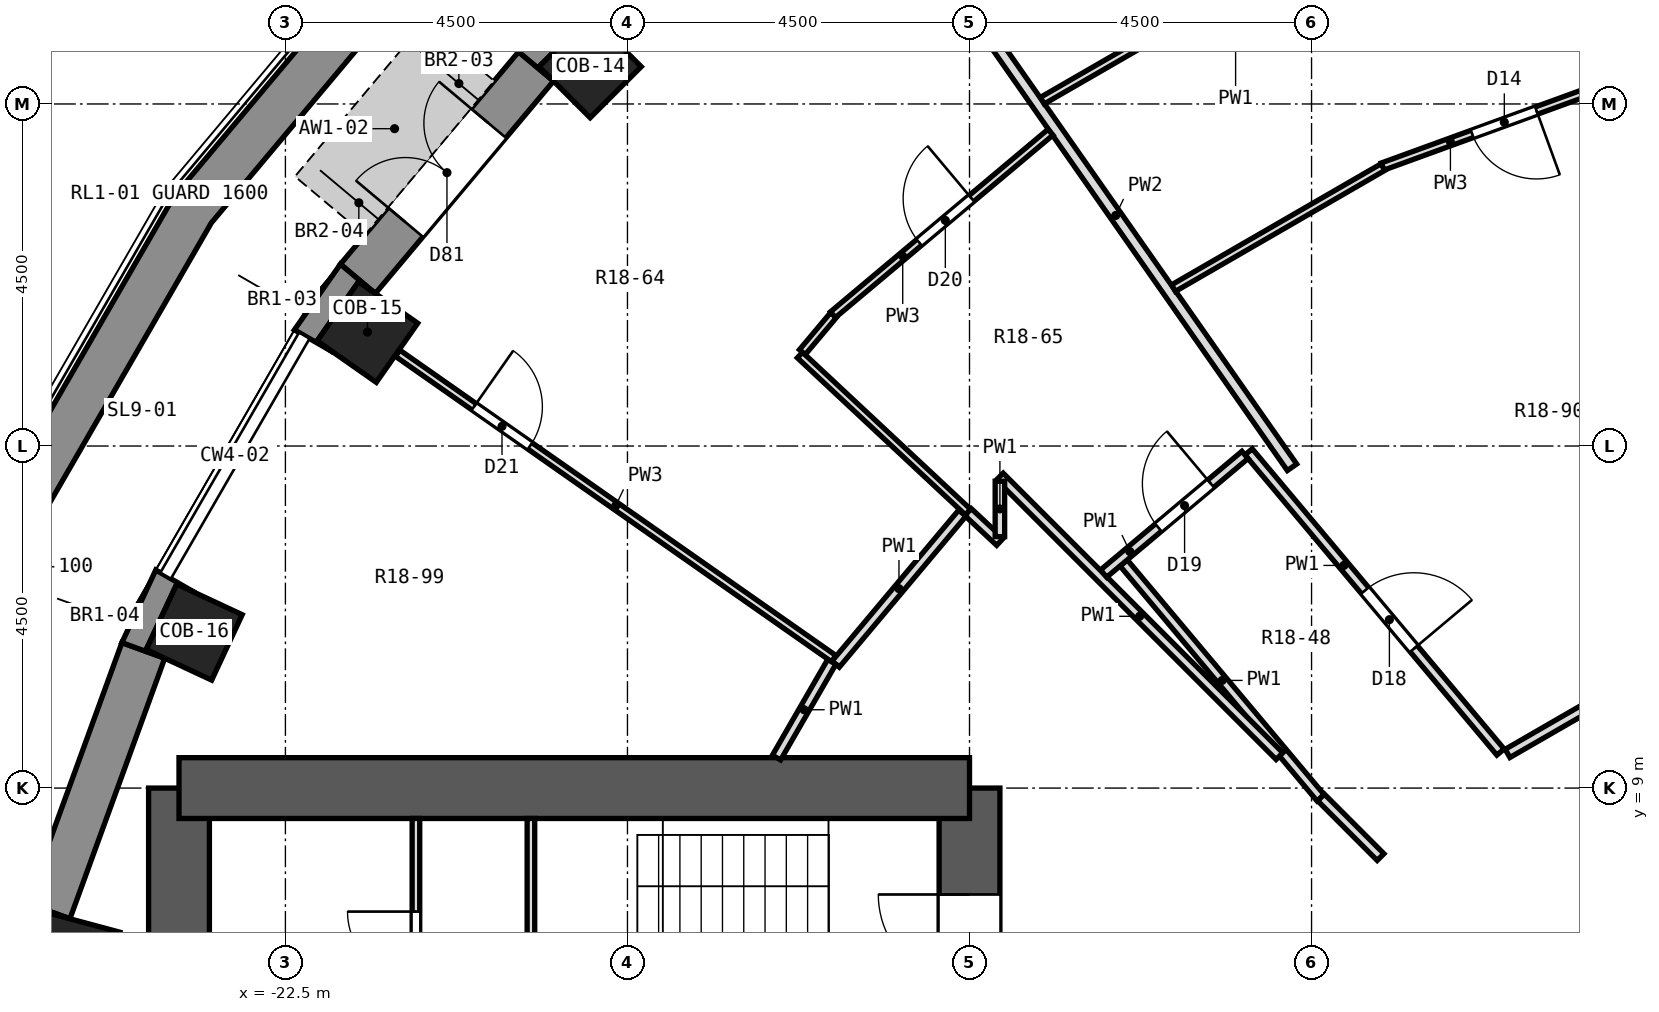
"""IFC4 building model, lengths in metres.
Left out: names, types, materials, properties, quantities, classifications, styles, units other than length and angle.
Written with IfcOpenShell. Run it as: python <this file> out.ifc"""

import sys

from ifc_helpers import new_model, si_unit, direction, frame, frame_2d, origin, origin_2d, place, context, subcontext, project, spatial, polyline, rectangle, outline, extrude, element, fill, save


model = new_model("IFC4")
c1 = context("Model", 3, precision=1e-05, world=origin(), true_north=direction((0.0, 1.0)))
c2 = subcontext(c1, "Body", "Model", "MODEL_VIEW")
j1 = project(units=[si_unit("LENGTHUNIT", "METRE"), si_unit("PLANEANGLEUNIT", "RADIAN")], contexts=[c1])
p1 = place(None, origin())
s1 = spatial("IfcSite", under=j1, at=p1, CompositionType="ELEMENT")
p2 = place(p1, origin())
s2 = spatial("IfcBuilding", under=s1, at=p2, CompositionType="ELEMENT")
p3 = place(p2, frame((0.0, 0.0, 101.8)))
s3 = spatial("IfcBuildingStorey", under=s2, at=p3, CompositionType="ELEMENT", Elevation=101.8)
for number, where, z_axis, x_axis in (
    (1, (-18.491, 18.491, 0.0), (0.0, 0.0, 1.0), (-0.707, 0.707, 0.0)),
    (2, (-21.421, 14.999, 0.0), (0.0, 0.0, 1.0), (-0.819, 0.574, 0.0)),
    (3, (-23.7, 11.052, 0.0), (0.0, 0.0, 1.0), (-0.906, 0.423, 0.0)),
    (4, (-25.259, 6.768, 0.0), (0.0, 0.0, 1.0), (-0.966, 0.259, 0.0)),
):
    element("IfcColumn", number, at=place(p3, frame(where, z_axis=z_axis, x_axis=x_axis)), inside=s3, PredefinedType="COLUMN", context=c2, shape_type="SweptSolid", body=[
        extrude(rectangle(XDim=0.95, YDim=0.95, at=origin_2d()), origin(), (0.0, 0.0, 1.0), 3.3),
    ])
p4 = place(p3, frame((-13.5, -9.0, 0.0), z_axis=(0.0, 0.0, 1.0), x_axis=(0.0, 1.0, 0.0)))
e5 = element("IfcWall", 5, at=p4, inside=s3, PredefinedType="SHEAR", context=c2, shape_type="SweptSolid", body=[
    extrude(rectangle(XDim=18.0, YDim=0.8, at=frame_2d((9.0, 0.0))), origin(), (0.0, 0.0, 1.0), 3.3),
])
p5 = place(p4, frame((15.4, 0.0, 0.0)))
e6 = element("IfcOpeningElement", 6, at=p5, cuts=e5, PredefinedType="OPENING", context=c2, shape_type="SweptSolid", body=[
    extrude(rectangle(XDim=1.2, YDim=2.1, at=frame_2d((0.6, 1.05))), frame((0.0, 0.412, 0.0), z_axis=(0.0, -1.0, 0.0), x_axis=(1.0, 0.0, 0.0)), (0.0, 0.0, 1.0), 0.824),
])
p6 = place(p4, frame((1.4, 0.0, 0.0)))
e7 = element("IfcOpeningElement", 7, at=p6, cuts=e5, PredefinedType="OPENING", context=c2, shape_type="SweptSolid", body=[
    extrude(rectangle(XDim=1.2, YDim=2.1, at=frame_2d((0.6, 1.05))), frame((0.0, 0.412, 0.0), z_axis=(0.0, -1.0, 0.0), x_axis=(1.0, 0.0, 0.0)), (0.0, 0.0, 1.0), 0.824),
])
p7 = place(p4, frame((7.5, 0.0, 0.0)))
e8 = element("IfcOpeningElement", 8, at=p7, cuts=e5, PredefinedType="OPENING", context=c2, shape_type="SweptSolid", body=[
    extrude(rectangle(XDim=3.0, YDim=2.4, at=frame_2d((1.5, 1.2))), frame((0.0, 0.412, 0.0), z_axis=(0.0, -1.0, 0.0), x_axis=(1.0, 0.0, 0.0)), (0.0, 0.0, 1.0), 0.824),
])
p8 = place(p3, frame((-23.9, -9.0, 0.0), z_axis=(0.0, 0.0, 1.0), x_axis=(0.0, 1.0, 0.0)))
e9 = element("IfcWall", 9, at=p8, inside=s3, PredefinedType="SHEAR", context=c2, shape_type="SweptSolid", body=[
    extrude(rectangle(XDim=18.0, YDim=0.8, at=frame_2d((9.0, 0.0))), origin(), (0.0, 0.0, 1.0), 3.3),
])
p9 = place(p3, frame((-13.5, 9.0, 0.0), z_axis=(0.0, 0.0, 1.0), x_axis=(-1.0, 0.0, 0.0)))
e10 = element("IfcWall", 10, at=p9, inside=s3, PredefinedType="SHEAR", context=c2, shape_type="SweptSolid", body=[
    extrude(rectangle(XDim=10.4, YDim=0.8, at=frame_2d((5.2, 0.0))), origin(), (0.0, 0.0, 1.0), 3.3),
])
p10 = place(p3, frame((-19.202, 18.494, 0.0), z_axis=(0.0, 0.0, 1.0), x_axis=(-0.642774476932, -0.766055462616, 0.0)))
e11 = element("IfcWall", 11, at=p10, inside=s3, PredefinedType="SOLIDWALL", context=c2, shape_type="SweptSolid", body=[
    extrude(rectangle(XDim=3.648, YDim=0.6, at=frame_2d((1.824, 0.0))), origin(), (0.0, 0.0, 1.0), 2.8),
])
p11 = place(p10, frame((0.974, 0.0, 0.0)))
e12 = element("IfcOpeningElement", 12, at=p11, cuts=e11, PredefinedType="OPENING", context=c2, shape_type="SweptSolid", body=[
    extrude(rectangle(XDim=1.7, YDim=2.4, at=frame_2d((0.85, 1.2))), frame((0.0, 0.312, 0.0), z_axis=(0.0, -1.0, 0.0), x_axis=(1.0, 0.0, 0.0)), (0.0, 0.0, 1.0), 0.624),
])
p12 = place(p3, frame((-24.369, 10.811, 0.0), z_axis=(0.0, 0.0, 1.0), x_axis=(-0.341990236633, -0.939703505393, 0.0)))
e13 = element("IfcWall", 13, at=p12, inside=s3, PredefinedType="SOLIDWALL", context=c2, shape_type="SweptSolid", body=[
    extrude(rectangle(XDim=3.648, YDim=0.6, at=frame_2d((1.824, 0.0))), origin(), (0.0, 0.0, 1.0), 2.8),
])
p13 = place(p3, origin())
e14 = element("IfcWall", 14, at=p13, inside=s3, PredefinedType="SOLIDWALL", context=c2, shape_type="SweptSolid", body=[
    extrude(outline(polyline([(-18.686, 19.432), (-19.432, 18.686), (-18.972, 18.301), (-19.163, 18.491), (-18.491, 19.163), (-18.301, 18.972), (-18.686, 19.432)])), origin(), (0.0, 0.0, 1.0), 2.8),
])
p14 = place(p3, origin())
e15 = element("IfcWall", 15, at=p14, inside=s3, PredefinedType="SOLIDWALL", context=c2, shape_type="SweptSolid", body=[
    extrude(outline(polyline([(-22.382, 15.028), (-21.862, 14.728), (-22.083, 14.882), (-21.538, 15.661), (-21.317, 15.506), (-21.777, 15.892), (-22.382, 15.028)])), origin(), (0.0, 0.0, 1.0), 2.8),
])
p15 = place(p3, origin())
e16 = element("IfcWall", 16, at=p15, inside=s3, PredefinedType="SOLIDWALL", context=c2, shape_type="SweptSolid", body=[
    extrude(outline(polyline([(-24.651, 10.913), (-24.087, 10.708), (-24.331, 10.822), (-23.93, 11.683), (-23.686, 11.569), (-24.206, 11.869), (-24.651, 10.913)])), origin(), (0.0, 0.0, 1.0), 2.8),
])
p16 = place(p3, origin())
e17 = element("IfcWall", 17, at=p16, inside=s3, PredefinedType="SOLIDWALL", context=c2, shape_type="SweptSolid", body=[
    extrude(outline(polyline([(-25.899, 7.486), (-26.172, 6.467), (-25.581, 6.363), (-25.841, 6.432), (-25.595, 7.35), (-25.335, 7.28), (-25.899, 7.486)])), origin(), (0.0, 0.0, 1.0), 2.8),
])
p17 = place(p3, frame((-2.527, 8.125, 0.0), z_axis=(0.0, 0.0, 1.0), x_axis=(-0.86604563398, -0.499964958637, 0.0)))
e18 = element("IfcWall", 18, at=p17, inside=s3, PredefinedType="SOLIDWALL", context=c2, shape_type="SweptSolid", body=[
    extrude(rectangle(XDim=3.747, YDim=0.6, at=frame_2d((1.874, 0.0))), origin(), (0.0, 0.0, 1.0), 2.8),
])
p18 = place(p17, frame((0.674, 0.0, 0.9)))
e19 = element("IfcOpeningElement", 19, at=p18, cuts=e18, PredefinedType="OPENING", context=c2, shape_type="SweptSolid", body=[
    extrude(rectangle(XDim=2.4, YDim=1.8, at=frame_2d((1.2, 0.9))), frame((0.0, 0.312, 0.0), z_axis=(0.0, -1.0, 0.0), x_axis=(1.0, 0.0, 0.0)), (0.0, 0.0, 1.0), 0.624),
])
p19 = place(p3, origin())
e20 = element("IfcWall", 20, at=p19, inside=s3, PredefinedType="PARAPET", context=c2, shape_type="SweptSolid", body=[
    extrude(outline(polyline([(-20.689, 20.689), (-23.967, 16.782), (-26.517, 12.365), (-25.971, 12.111), (-23.474, 16.437), (-20.263, 20.263), (-20.689, 20.689)])), origin(), (0.0, 0.0, 1.0), 0.5),
])
p20 = place(p3, frame((-13.896, 19.846, 0.0), z_axis=(0.0, 0.0, 1.0), x_axis=(0.573571733859, -0.819155336989, 0.0)))
e21 = element("IfcWall", 21, at=p20, inside=s3, PredefinedType="PARTITIONING", context=c2, shape_type="SweptSolid", body=[
    extrude(rectangle(XDim=8.088, YDim=0.15, at=frame_2d((4.044, 0.0))), origin(), (0.0, 0.0, 1.0), 2.8),
])
p21 = place(p3, frame((-11.472, 11.962, 0.0), z_axis=(0.0, 0.0, 1.0), x_axis=(0.642533165624, -0.766257875048, 0.0)))
e22 = element("IfcWall", 22, at=p21, inside=s3, PredefinedType="PARTITIONING", context=c2, shape_type="SweptSolid", body=[
    extrude(rectangle(XDim=4.033, YDim=0.125, at=frame_2d((2.017, 0.0))), origin(), (0.0, 0.0, 1.0), 2.8),
])
p22 = place(p3, frame((-9.828, 13.423, 0.0), z_axis=(0.0, 0.0, 1.0), x_axis=(0.642779949684, -0.766050870559, 0.0)))
e23 = element("IfcWall", 23, at=p22, inside=s3, PredefinedType="PARTITIONING", context=c2, shape_type="SweptSolid", body=[
    extrude(rectangle(XDim=5.155, YDim=0.125, at=frame_2d((2.578, 0.0))), origin(), (0.0, 0.0, 1.0), 2.8),
])
p23 = place(p22, frame((2.381, 0.0, 0.0)))
e24 = element("IfcOpeningElement", 24, at=p23, cuts=e23, PredefinedType="OPENING", context=c2, shape_type="SweptSolid", body=[
    extrude(rectangle(XDim=1.0, YDim=2.1, at=frame_2d((0.5, 1.05))), frame((0.0, 0.074, 0.0), z_axis=(0.0, -1.0, 0.0), x_axis=(1.0, 0.0, 0.0)), (0.0, 0.0, 1.0), 0.149),
])
p24 = place(p3, frame((-8.875, 8.876, 0.0), z_axis=(0.0, 0.0, 1.0), x_axis=(0.706666079052, -0.707547208826, 0.0)))
e25 = element("IfcWall", 25, at=p24, inside=s3, PredefinedType="PARTITIONING", context=c2, shape_type="SweptSolid", body=[
    extrude(rectangle(XDim=1.108, YDim=0.125, at=frame_2d((0.554, 0.0))), origin(), (0.0, 0.0, 1.0), 2.8),
])
p25 = place(p3, frame((-13.101, 13.099, 0.0), z_axis=(0.0, 0.0, 1.0), x_axis=(0.707106781187, -0.707106781187, 0.0)))
e26 = element("IfcWall", 26, at=p25, inside=s3, PredefinedType="PARTITIONING", context=c2, shape_type="SweptSolid", body=[
    extrude(rectangle(XDim=5.203, YDim=0.125, at=frame_2d((2.602, 0.0))), origin(), (0.0, 0.0, 1.0), 2.8),
])
p26 = place(p3, frame((-15.731, 14.697, 0.0), z_axis=(0.0, 0.0, 1.0), x_axis=(0.730698385908, -0.682700423928, 0.0)))
e27 = element("IfcWall", 27, at=p26, inside=s3, PredefinedType="PARTITIONING", context=c2, shape_type="SweptSolid", body=[
    extrude(rectangle(XDim=3.026, YDim=0.1, at=frame_2d((1.513, 0.0))), origin(), (0.0, 0.0, 1.0), 2.8),
])
p27 = place(p3, frame((-13.52, 12.631, 0.0), z_axis=(0.0, 0.0, 1.0), x_axis=(0.730729867614, -0.682666727311, 0.0)))
e28 = element("IfcWall", 28, at=p27, inside=s3, PredefinedType="PARTITIONING", context=c2, shape_type="SweptSolid", body=[
    extrude(rectangle(XDim=0.574, YDim=0.125, at=frame_2d((0.287, 0.0))), origin(), (0.0, 0.0, 1.0), 2.8),
])
p28 = place(p3, frame((-21.024, 14.721, 0.0), z_axis=(0.0, 0.0, 1.0), x_axis=(0.81911727686, -0.573626086183, 0.0)))
e29 = element("IfcWall", 29, at=p28, inside=s3, PredefinedType="PARTITIONING", context=c2, shape_type="SweptSolid", body=[
    extrude(rectangle(XDim=7.004, YDim=0.1, at=frame_2d((3.502, 0.0))), origin(), (0.0, 0.0, 1.0), 2.8),
])
p29 = place(p28, frame((1.226, 0.0, 0.0)))
e30 = element("IfcOpeningElement", 30, at=p29, cuts=e29, PredefinedType="OPENING", context=c2, shape_type="SweptSolid", body=[
    extrude(rectangle(XDim=0.9, YDim=2.1, at=frame_2d((0.45, 1.05))), frame((0.0, 0.062, 0.0), z_axis=(0.0, -1.0, 0.0), x_axis=(1.0, 0.0, 0.0)), (0.0, 0.0, 1.0), 0.124),
])
p30 = place(p3, frame((-8.066, 17.177, 0.0), z_axis=(0.0, 0.0, 1.0), x_axis=(0.939726606236, 0.341926754629, 0.0)))
e31 = element("IfcWall", 31, at=p30, inside=s3, PredefinedType="PARTITIONING", context=c2, shape_type="SweptSolid", body=[
    extrude(rectangle(XDim=3.308, YDim=0.1, at=frame_2d((1.654, 0.0))), origin(), (0.0, 0.0, 1.0), 2.8),
])
p31 = place(p30, frame((1.254, 0.0, 0.0)))
e32 = element("IfcOpeningElement", 32, at=p31, cuts=e31, PredefinedType="OPENING", context=c2, shape_type="SweptSolid", body=[
    extrude(rectangle(XDim=0.9, YDim=2.1, at=frame_2d((0.45, 1.05))), frame((0.0, 0.062, 0.0), z_axis=(0.0, -1.0, 0.0), x_axis=(1.0, 0.0, 0.0)), (0.0, 0.0, 1.0), 0.124),
])
p32 = place(p3, frame((-6.421, 9.456, 0.0), z_axis=(0.0, 0.0, 1.0), x_axis=(0.866153397047, 0.499778243608, 0.0)))
e33 = element("IfcWall", 33, at=p32, inside=s3, PredefinedType="PARTITIONING", context=c2, shape_type="SweptSolid", body=[
    extrude(rectangle(XDim=1.768, YDim=0.125, at=frame_2d((0.884, 0.0))), origin(), (0.0, 0.0, 1.0), 2.8),
])
p33 = place(p3, frame((-10.816, 15.578, 0.0), z_axis=(0.0, 0.0, 1.0), x_axis=(0.865900530636, 0.500216224292, 0.0)))
e34 = element("IfcWall", 34, at=p33, inside=s3, PredefinedType="PARTITIONING", context=c2, shape_type="SweptSolid", body=[
    extrude(rectangle(XDim=3.181, YDim=0.1, at=frame_2d((1.591, 0.0))), origin(), (0.0, 0.0, 1.0), 2.8),
])
p34 = place(p3, frame((-12.542, 18.044, 0.0), z_axis=(0.0, 0.0, 1.0), x_axis=(0.866154304779, 0.499776670437, 0.0)))
e35 = element("IfcWall", 35, at=p34, inside=s3, PredefinedType="PARTITIONING", context=c2, shape_type="SweptSolid", body=[
    extrude(rectangle(XDim=2.079, YDim=0.1, at=frame_2d((1.04, 0.0))), origin(), (0.0, 0.0, 1.0), 2.8),
])
p35 = place(p3, frame((-11.736, 11.822, 0.0), z_axis=(0.0, 0.0, 1.0), x_axis=(0.765966295507, 0.642880730888, 0.0)))
e36 = element("IfcWall", 36, at=p35, inside=s3, PredefinedType="PARTITIONING", context=c2, shape_type="SweptSolid", body=[
    extrude(rectangle(XDim=2.428, YDim=0.125, at=frame_2d((1.214, 0.0))), origin(), (0.0, 0.0, 1.0), 2.8),
])
p36 = place(p35, frame((0.941, 0.0, 0.0)))
e37 = element("IfcOpeningElement", 37, at=p36, cuts=e36, PredefinedType="OPENING", context=c2, shape_type="SweptSolid", body=[
    extrude(rectangle(XDim=0.9, YDim=2.1, at=frame_2d((0.45, 1.05))), frame((0.0, 0.074, 0.0), z_axis=(0.0, -1.0, 0.0), x_axis=(1.0, 0.0, 0.0)), (0.0, 0.0, 1.0), 0.149),
])
p37 = place(p3, frame((-15.298, 15.226, 0.0), z_axis=(0.0, 0.0, 1.0), x_axis=(0.766080513043, 0.642744620775, 0.0)))
e38 = element("IfcWall", 38, at=p37, inside=s3, PredefinedType="PARTITIONING", context=c2, shape_type="SweptSolid", body=[
    extrude(rectangle(XDim=3.737, YDim=0.1, at=frame_2d((1.869, 0.0))), origin(), (0.0, 0.0, 1.0), 2.8),
])
p38 = place(p37, frame((1.482, 0.0, 0.0)))
e39 = element("IfcOpeningElement", 39, at=p38, cuts=e38, PredefinedType="OPENING", context=c2, shape_type="SweptSolid", body=[
    extrude(rectangle(XDim=0.9, YDim=2.1, at=frame_2d((0.45, 1.05))), frame((0.0, 0.062, 0.0), z_axis=(0.0, -1.0, 0.0), x_axis=(1.0, 0.0, 0.0)), (0.0, 0.0, 1.0), 0.124),
])
p39 = place(p3, frame((-15.261, 10.63, 0.0), z_axis=(0.0, 0.0, 1.0), x_axis=(0.642663987788, 0.766148157213, 0.0)))
e40 = element("IfcWall", 40, at=p39, inside=s3, PredefinedType="PARTITIONING", context=c2, shape_type="SweptSolid", body=[
    extrude(rectangle(XDim=2.592, YDim=0.125, at=frame_2d((1.296, 0.0))), origin(), (0.0, 0.0, 1.0), 2.8),
])
p40 = place(p3, frame((-15.699, 14.735, 0.0), z_axis=(0.0, 0.0, 1.0), x_axis=(0.642984258382, 0.765879392249, 0.0)))
e41 = element("IfcWall", 41, at=p40, inside=s3, PredefinedType="PARTITIONING", context=c2, shape_type="SweptSolid", body=[
    extrude(rectangle(XDim=0.634, YDim=0.1, at=frame_2d((0.317, 0.0))), origin(), (0.0, 0.0, 1.0), 2.8),
])
p41 = place(p3, frame((-16.039, 9.401, 0.0), z_axis=(0.0, 0.0, 1.0), x_axis=(0.499950205064, 0.866054150996, 0.0)))
e42 = element("IfcWall", 42, at=p41, inside=s3, PredefinedType="PARTITIONING", context=c2, shape_type="SweptSolid", body=[
    extrude(rectangle(XDim=1.454, YDim=0.125, at=frame_2d((0.727, 0.0))), origin(), (0.0, 0.0, 1.0), 2.8),
])
p42 = place(p3, frame((-13.1, 12.309, 0.0), z_axis=(0.0, 0.0, 1.0), x_axis=(0.0, 1.0, 0.0)))
e43 = element("IfcWall", 43, at=p42, inside=s3, PredefinedType="PARTITIONING", context=c2, shape_type="SweptSolid", body=[
    extrude(rectangle(XDim=0.728, YDim=0.125, at=frame_2d((0.364, 0.0))), origin(), (0.0, 0.0, 1.0), 2.8),
])
p43 = place(p3, frame((-19.27, 5.25, 0.0), z_axis=(0.0, 0.0, 1.0), x_axis=(0.0, 1.0, 0.0)))
e44 = element("IfcWall", 44, at=p43, inside=s3, PredefinedType="PARTITIONING", context=c2, shape_type="SweptSolid", body=[
    extrude(rectangle(XDim=3.35, YDim=0.1, at=frame_2d((1.675, 0.0))), origin(), (0.0, 0.0, 1.0), 2.8),
])
p44 = place(p3, frame((-20.783, 5.25, 0.0), z_axis=(0.0, 0.0, 1.0), x_axis=(0.0, 1.0, 0.0)))
e45 = element("IfcWall", 45, at=p44, inside=s3, PredefinedType="PARTITIONING", context=c2, shape_type="SweptSolid", body=[
    extrude(rectangle(XDim=3.35, YDim=0.1, at=frame_2d((1.675, 0.0))), origin(), (0.0, 0.0, 1.0), 2.8),
])
p45 = place(p44, frame((1.225, 0.0, 0.0)))
e46 = element("IfcOpeningElement", 46, at=p45, cuts=e45, PredefinedType="OPENING", context=c2, shape_type="SweptSolid", body=[
    extrude(rectangle(XDim=0.9, YDim=2.1, at=frame_2d((0.45, 1.05))), frame((0.0, 0.062, 0.0), z_axis=(0.0, -1.0, 0.0), x_axis=(1.0, 0.0, 0.0)), (0.0, 0.0, 1.0), 0.124),
])
p46 = place(p11, frame((1.7, 0.0, 0.0), z_axis=(0.0, 0.0, 1.0), x_axis=(-1.0, 0.0, 0.0)))
e47 = element("IfcDoor", 47, at=p46, inside=s3, OperationType="DOUBLE_DOOR_SINGLE_SWING", PredefinedType="DOOR", context=c2, shape_type="SweptSolid", body=[
    extrude(rectangle(XDim=1.7, YDim=2.4, at=frame_2d((0.85, 1.2))), frame((0.0, -0.075, 0.0), z_axis=(0.0, -1.0, 0.0), x_axis=(1.0, 0.0, 0.0)), (0.0, 0.0, 1.0), 0.05),
])
fill(e12, e47)
p47 = place(p31, frame((0.9, 0.0, 0.0), z_axis=(0.0, 0.0, 1.0), x_axis=(-1.0, 0.0, 0.0)))
e48 = element("IfcDoor", 48, at=p47, inside=s3, OperationType="SINGLE_SWING_LEFT", PredefinedType="DOOR", context=c2, shape_type="SweptSolid", body=[
    extrude(rectangle(XDim=0.9, YDim=2.1, at=frame_2d((0.45, 1.05))), frame((0.0, 0.025, 0.0), z_axis=(0.0, -1.0, 0.0), x_axis=(1.0, 0.0, 0.0)), (0.0, 0.0, 1.0), 0.05),
])
fill(e32, e48)
p48 = place(p23, origin())
e49 = element("IfcDoor", 49, at=p48, inside=s3, OperationType="SINGLE_SWING_RIGHT", PredefinedType="DOOR", context=c2, shape_type="SweptSolid", body=[
    extrude(rectangle(XDim=1.0, YDim=2.1, at=frame_2d((0.5, 1.05))), frame((0.0, 0.025, 0.0), z_axis=(0.0, -1.0, 0.0), x_axis=(1.0, 0.0, 0.0)), (0.0, 0.0, 1.0), 0.05),
])
fill(e24, e49)
p49 = place(p36, origin())
e50 = element("IfcDoor", 50, at=p49, inside=s3, OperationType="SINGLE_SWING_RIGHT", PredefinedType="DOOR", context=c2, shape_type="SweptSolid", body=[
    extrude(rectangle(XDim=0.9, YDim=2.1, at=frame_2d((0.45, 1.05))), frame((0.0, 0.025, 0.0), z_axis=(0.0, -1.0, 0.0), x_axis=(1.0, 0.0, 0.0)), (0.0, 0.0, 1.0), 0.05),
])
fill(e37, e50)
p50 = place(p38, origin())
e51 = element("IfcDoor", 51, at=p50, inside=s3, OperationType="SINGLE_SWING_RIGHT", PredefinedType="DOOR", context=c2, shape_type="SweptSolid", body=[
    extrude(rectangle(XDim=0.9, YDim=2.1, at=frame_2d((0.45, 1.05))), frame((0.0, 0.025, 0.0), z_axis=(0.0, -1.0, 0.0), x_axis=(1.0, 0.0, 0.0)), (0.0, 0.0, 1.0), 0.05),
])
fill(e39, e51)
p51 = place(p29, origin())
e52 = element("IfcDoor", 52, at=p51, inside=s3, OperationType="SINGLE_SWING_LEFT", PredefinedType="DOOR", context=c2, shape_type="SweptSolid", body=[
    extrude(rectangle(XDim=0.9, YDim=2.1, at=frame_2d((0.45, 1.05))), frame((0.0, 0.025, 0.0), z_axis=(0.0, -1.0, 0.0), x_axis=(1.0, 0.0, 0.0)), (0.0, 0.0, 1.0), 0.05),
])
fill(e30, e52)
p52 = place(p45, origin())
e53 = element("IfcDoor", 53, at=p52, inside=s3, OperationType="SINGLE_SWING_RIGHT", PredefinedType="DOOR", context=c2, shape_type="SweptSolid", body=[
    extrude(rectangle(XDim=0.9, YDim=2.1, at=frame_2d((0.45, 1.05))), frame((0.0, 0.025, 0.0), z_axis=(0.0, -1.0, 0.0), x_axis=(1.0, 0.0, 0.0)), (0.0, 0.0, 1.0), 0.05),
])
fill(e46, e53)
p53 = place(p5, origin())
e54 = element("IfcDoor", 54, at=p53, inside=s3, OperationType="SINGLE_SWING_RIGHT", PredefinedType="DOOR", context=c2, shape_type="SweptSolid", body=[
    extrude(rectangle(XDim=1.2, YDim=2.1, at=frame_2d((0.6, 1.05))), frame((0.0, 0.025, 0.0), z_axis=(0.0, -1.0, 0.0), x_axis=(1.0, 0.0, 0.0)), (0.0, 0.0, 1.0), 0.05),
])
fill(e6, e54)
save(model, sys.argv[1])
